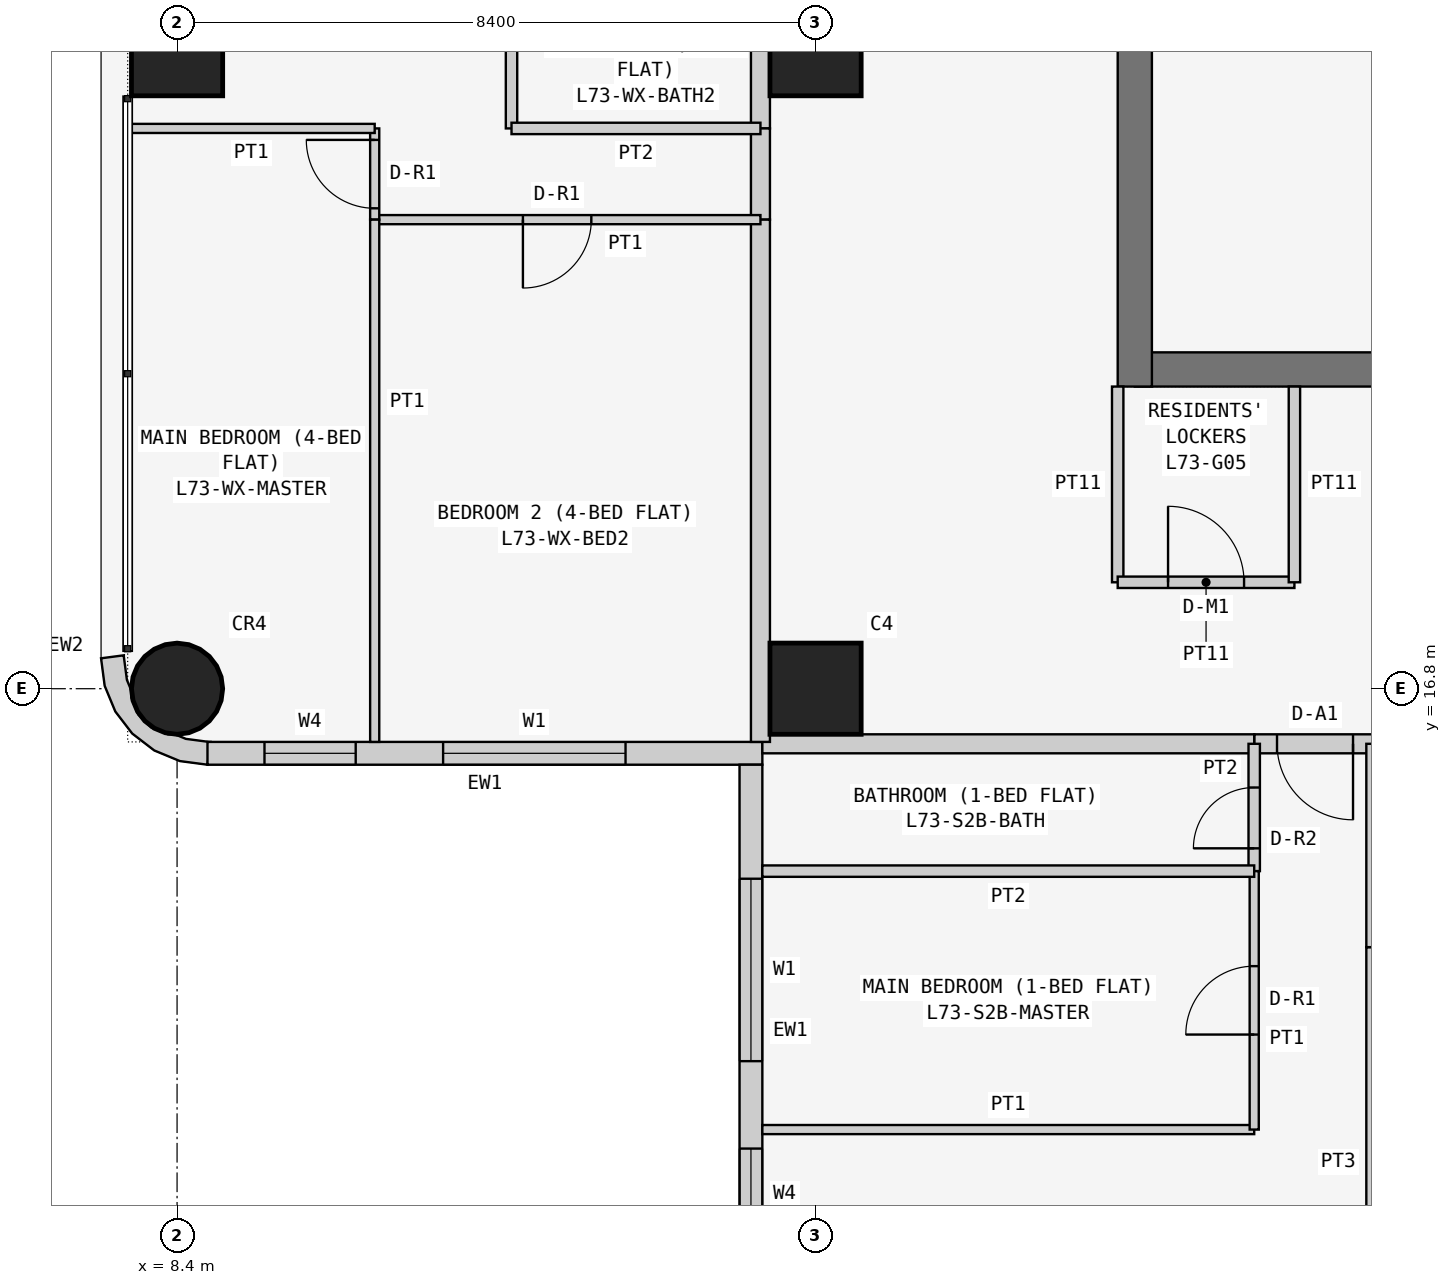
"""IFC4 building model, lengths in metres.
Left out: names, types, materials, properties, quantities, classifications, styles, units other than length and angle.
Written with IfcOpenShell. Run it as: python <this file> out.ifc"""

import sys

from ifc_helpers import new_model, si_unit, direction, frame, frame_2d, origin, origin_2d, place, context, subcontext, project, spatial, polyline, rectangle, circle, outline, extrude, element, fill, save


model = new_model("IFC4")
c1 = context("Model", 3, precision=1e-05, world=origin(), true_north=direction((0.0, 1.0)))
c2 = subcontext(c1, "Body", "Model", "MODEL_VIEW")
j1 = project(units=[si_unit("LENGTHUNIT", "METRE"), si_unit("PLANEANGLEUNIT", "RADIAN")], contexts=[c1])
p1 = place(None, origin())
s1 = spatial("IfcSite", under=j1, at=p1, CompositionType="ELEMENT")
p2 = place(p1, origin())
s2 = spatial("IfcBuilding", under=s1, at=p2, CompositionType="ELEMENT")
p3 = place(p2, frame((0.0, 0.0, 279.3)))
s3 = spatial("IfcBuildingStorey", under=s2, at=p3, CompositionType="ELEMENT", Elevation=279.3)
p4 = place(p3, frame((8.4, 16.8, 0.0), z_axis=(0.0, 0.0, 1.0), x_axis=(1.0, 0.0, 0.0)))
e1 = element("IfcColumn", 1, at=p4, inside=s3, PredefinedType="COLUMN", context=c2, shape_type="SweptSolid", body=[
    extrude(circle(Radius=0.6, at=origin_2d()), origin(), (0.0, 0.0, 1.0), 3.6),
])
for number, where, z_axis, x_axis in (
    (2, (8.4, 25.2, 0.0), (0.0, 0.0, 1.0), (1.0, 0.0, 0.0)),
    (3, (16.8, 16.8, 0.0), (0.0, 0.0, 1.0), (1.0, 0.0, 0.0)),
    (4, (16.8, 25.2, 0.0), (0.0, 0.0, 1.0), (1.0, 0.0, 0.0)),
):
    element("IfcColumn", number, at=place(p3, frame(where, z_axis=z_axis, x_axis=x_axis)), inside=s3, PredefinedType="COLUMN", context=c2, shape_type="SweptSolid", body=[
        extrude(rectangle(XDim=1.2, YDim=1.2, at=origin_2d()), origin(), (0.0, 0.0, 1.0), 3.6),
    ])
p5 = place(p3, frame((21.0, 21.0, 0.0), z_axis=(0.0, 0.0, 1.0), x_axis=(1.0, 0.0, 0.0)))
e5 = element("IfcWall", 5, at=p5, inside=s3, PredefinedType="SHEAR", context=c2, shape_type="SweptSolid", body=[
    extrude(rectangle(XDim=17.025, YDim=0.45, at=frame_2d((8.512, 0.0))), origin(), (0.0, 0.0, 1.0), 3.6),
])
p6 = place(p3, frame((21.0, 37.8, 0.0), z_axis=(0.0, 0.0, 1.0), x_axis=(0.0, -1.0, 0.0)))
e6 = element("IfcWall", 6, at=p6, inside=s3, PredefinedType="SHEAR", context=c2, shape_type="SweptSolid", body=[
    extrude(rectangle(XDim=17.025, YDim=0.45, at=frame_2d((8.513, 0.0))), origin(), (0.0, 0.0, 1.0), 3.6),
])
p7 = place(p6, frame((5.4, 0.0, 0.0)))
e7 = element("IfcOpeningElement", 7, at=p7, cuts=e6, PredefinedType="OPENING", context=c2, shape_type="SweptSolid", body=[
    extrude(rectangle(XDim=1.2, YDim=2.1, at=frame_2d((0.6, 1.05))), frame((0.0, 0.235, 0.0), z_axis=(0.0, -1.0, 0.0), x_axis=(1.0, 0.0, 0.0)), (0.0, 0.0, 1.0), 0.47),
])
p8 = place(p3, frame((8.8, 15.95, 0.0), z_axis=(0.0, 0.0, 1.0), x_axis=(1.0, 0.0, 0.0)))
e8 = element("IfcWall", 8, at=p8, inside=s3, PredefinedType="SOLIDWALL", context=c2, shape_type="SweptSolid", body=[
    extrude(rectangle(XDim=7.3, YDim=0.3, at=frame_2d((3.65, 0.0))), origin(), (0.0, 0.0, 1.0), 3.45),
])
p9 = place(p8, frame((3.1, 0.0, 0.9)))
e9 = element("IfcOpeningElement", 9, at=p9, cuts=e8, PredefinedType="OPENING", context=c2, shape_type="SweptSolid", body=[
    extrude(rectangle(XDim=2.4, YDim=1.5, at=frame_2d((1.2, 0.75))), frame((0.0, 0.16, 0.0), z_axis=(0.0, -1.0, 0.0), x_axis=(1.0, 0.0, 0.0)), (0.0, 0.0, 1.0), 0.32),
])
p10 = place(p8, frame((0.75, 0.0, 0.9)))
e10 = element("IfcOpeningElement", 10, at=p10, cuts=e8, PredefinedType="OPENING", context=c2, shape_type="SweptSolid", body=[
    extrude(rectangle(XDim=1.2, YDim=1.5, at=frame_2d((0.6, 0.75))), frame((0.0, 0.16, 0.0), z_axis=(0.0, -1.0, 0.0), x_axis=(1.0, 0.0, 0.0)), (0.0, 0.0, 1.0), 0.32),
])
p11 = place(p3, frame((15.95, 15.8, 0.0), z_axis=(0.0, 0.0, 1.0), x_axis=(0.0, -1.0, 0.0)))
e11 = element("IfcWall", 11, at=p11, inside=s3, PredefinedType="SOLIDWALL", context=c2, shape_type="SweptSolid", body=[
    extrude(rectangle(XDim=7.0, YDim=0.3, at=frame_2d((3.5, 0.0))), origin(), (0.0, 0.0, 1.0), 3.45),
])
p12 = place(p11, frame((1.5, 0.0, 0.9)))
e12 = element("IfcOpeningElement", 12, at=p12, cuts=e11, PredefinedType="OPENING", context=c2, shape_type="SweptSolid", body=[
    extrude(rectangle(XDim=2.4, YDim=1.5, at=frame_2d((1.2, 0.75))), frame((0.0, 0.16, 0.0), z_axis=(0.0, -1.0, 0.0), x_axis=(1.0, 0.0, 0.0)), (0.0, 0.0, 1.0), 0.32),
])
p13 = place(p11, frame((5.05, 0.0, 0.9)))
e13 = element("IfcOpeningElement", 13, at=p13, cuts=e11, PredefinedType="OPENING", context=c2, shape_type="SweptSolid", body=[
    extrude(rectangle(XDim=1.2, YDim=1.5, at=frame_2d((0.6, 0.75))), frame((0.0, 0.16, 0.0), z_axis=(0.0, -1.0, 0.0), x_axis=(1.0, 0.0, 0.0)), (0.0, 0.0, 1.0), 0.32),
])
p14 = place(p3, frame((7.824, 17.162, 0.0), z_axis=(0.0, 0.0, 1.0), x_axis=(-0.707106781187, -0.707106781187, 0.0)))
e14 = element("IfcWall", 14, at=p14, inside=s3, PredefinedType="SOLIDWALL", context=c2, shape_type="SweptSolid", body=[
    extrude(outline(polyline([(0.047, 1.454), (0.233, 1.212), (0.292, 1.069), (0.358, 1.003), (0.449, 0.782), (0.449, 0.543), (0.358, 0.323), (0.292, 0.257), (0.233, 0.114), (0.047, -0.129), (0.033, -0.143), (0.273, -0.327), (0.495, -0.037), (0.635, 0.301), (0.683, 0.663), (0.635, 1.025), (0.495, 1.363), (0.273, 1.653), (0.033, 1.469), (0.047, 1.454)])), origin(), (0.0, 0.0, 1.0), 3.45),
])
p15 = place(p3, frame((20.775, 20.775, 0.0), z_axis=(0.0, 0.0, 1.0), x_axis=(0.0, -1.0, 0.0)))
e15 = element("IfcWall", 15, at=p15, inside=s3, PredefinedType="PARTITIONING", context=c2, shape_type="SweptSolid", body=[
    extrude(rectangle(XDim=2.575, YDim=0.15, at=frame_2d((1.288, 0.0))), origin(), (0.0, 0.0, 1.0), 3.45),
])
p16 = place(p3, frame((20.775, 18.2, 0.0), z_axis=(0.0, 0.0, 1.0), x_axis=(1.0, 0.0, 0.0)))
e16 = element("IfcWall", 16, at=p16, inside=s3, PredefinedType="PARTITIONING", context=c2, shape_type="SweptSolid", body=[
    extrude(rectangle(XDim=2.325, YDim=0.15, at=frame_2d((1.163, 0.0))), origin(), (0.0, 0.0, 1.0), 3.45),
])
p17 = place(p16, frame((0.663, 0.0, 0.0)))
e17 = element("IfcOpeningElement", 17, at=p17, cuts=e16, PredefinedType="OPENING", context=c2, shape_type="SweptSolid", body=[
    extrude(rectangle(XDim=1.0, YDim=2.1, at=frame_2d((0.5, 1.05))), frame((0.0, 0.085, 0.0), z_axis=(0.0, -1.0, 0.0), x_axis=(1.0, 0.0, 0.0)), (0.0, 0.0, 1.0), 0.17),
])
p18 = place(p3, frame((23.1, 18.2, 0.0), z_axis=(0.0, 0.0, 1.0), x_axis=(0.0, 1.0, 0.0)))
e18 = element("IfcWall", 18, at=p18, inside=s3, PredefinedType="PARTITIONING", context=c2, shape_type="SweptSolid", body=[
    extrude(rectangle(XDim=2.575, YDim=0.15, at=frame_2d((1.288, 0.0))), origin(), (0.0, 0.0, 1.0), 3.45),
])
p19 = place(p3, frame((24.171, 16.075, 0.0), z_axis=(0.0, 0.0, 1.0), x_axis=(-1.0, 0.0, 0.0)))
e19 = element("IfcWall", 19, at=p19, inside=s3, PredefinedType="PARTITIONING", context=c2, shape_type="SweptSolid", body=[
    extrude(rectangle(XDim=1.6, YDim=0.25, at=frame_2d((0.8, 0.0))), origin(), (0.0, 0.0, 1.0), 3.45),
])
p20 = place(p19, frame((0.3, 0.0, 0.0)))
e20 = element("IfcOpeningElement", 20, at=p20, cuts=e19, PredefinedType="OPENING", context=c2, shape_type="SweptSolid", body=[
    extrude(rectangle(XDim=1.0, YDim=2.1, at=frame_2d((0.5, 1.05))), frame((0.0, 0.135, 0.0), z_axis=(0.0, -1.0, 0.0), x_axis=(1.0, 0.0, 0.0)), (0.0, 0.0, 1.0), 0.27),
])
p21 = place(p3, frame((22.571, 16.075, 0.0), z_axis=(0.0, 0.0, 1.0), x_axis=(-1.0, 0.0, 0.0)))
e21 = element("IfcWall", 21, at=p21, inside=s3, PredefinedType="PARTITIONING", context=c2, shape_type="SweptSolid", body=[
    extrude(rectangle(XDim=6.471, YDim=0.25, at=frame_2d((3.235, 0.0))), origin(), (0.0, 0.0, 1.0), 3.45),
])
p22 = place(p3, frame((16.075, 24.171, 0.0), z_axis=(0.0, 0.0, 1.0), x_axis=(0.0, 1.0, 0.0)))
e22 = element("IfcWall", 22, at=p22, inside=s3, PredefinedType="PARTITIONING", context=c2, shape_type="SweptSolid", body=[
    extrude(rectangle(XDim=2.629, YDim=0.25, at=frame_2d((1.314, 0.0))), origin(), (0.0, 0.0, 1.0), 3.45),
])
p23 = place(p3, frame((16.075, 22.971, 0.0), z_axis=(0.0, 0.0, 1.0), x_axis=(0.0, 1.0, 0.0)))
e23 = element("IfcWall", 23, at=p23, inside=s3, PredefinedType="PARTITIONING", context=c2, shape_type="SweptSolid", body=[
    extrude(rectangle(XDim=1.2, YDim=0.25, at=frame_2d((0.6, 0.0))), origin(), (0.0, 0.0, 1.0), 3.45),
])
p24 = place(p3, frame((16.075, 16.1, 0.0), z_axis=(0.0, 0.0, 1.0), x_axis=(0.0, 1.0, 0.0)))
e24 = element("IfcWall", 24, at=p24, inside=s3, PredefinedType="PARTITIONING", context=c2, shape_type="SweptSolid", body=[
    extrude(rectangle(XDim=6.871, YDim=0.25, at=frame_2d((3.436, 0.0))), origin(), (0.0, 0.0, 1.0), 3.45),
])
p25 = place(p3, frame((24.171, 7.75, 0.0), z_axis=(0.0, 0.0, 1.0), x_axis=(0.0, 1.0, 0.0)))
e25 = element("IfcWall", 25, at=p25, inside=s3, PredefinedType="PARTITIONING", context=c2, shape_type="SweptSolid", body=[
    extrude(rectangle(XDim=5.65, YDim=0.25, at=frame_2d((2.825, 0.0))), origin(), (0.0, 0.0, 1.0), 3.45),
])
p26 = place(p3, frame((24.171, 13.4, 0.0), z_axis=(0.0, 0.0, 1.0), x_axis=(0.0, 1.0, 0.0)))
e26 = element("IfcWall", 26, at=p26, inside=s3, PredefinedType="PARTITIONING", context=c2, shape_type="SweptSolid", body=[
    extrude(rectangle(XDim=2.675, YDim=0.25, at=frame_2d((1.337, 0.0))), origin(), (0.0, 0.0, 1.0), 3.45),
])
p27 = place(p3, frame((22.571, 14.4, 0.0), z_axis=(0.0, 0.0, 1.0), x_axis=(0.0, 1.0, 0.0)))
e27 = element("IfcWall", 27, at=p27, inside=s3, PredefinedType="PARTITIONING", context=c2, shape_type="SweptSolid", body=[
    extrude(rectangle(XDim=1.675, YDim=0.15, at=frame_2d((0.837, 0.0))), origin(), (0.0, 0.0, 1.0), 3.45),
])
p28 = place(p27, frame((0.3, 0.0, 0.0)))
e28 = element("IfcOpeningElement", 28, at=p28, cuts=e27, PredefinedType="OPENING", context=c2, shape_type="SweptSolid", body=[
    extrude(rectangle(XDim=0.8, YDim=2.1, at=frame_2d((0.4, 1.05))), frame((0.0, 0.085, 0.0), z_axis=(0.0, -1.0, 0.0), x_axis=(1.0, 0.0, 0.0)), (0.0, 0.0, 1.0), 0.17),
])
p29 = place(p3, frame((16.1, 11.0, 0.0), z_axis=(0.0, 0.0, 1.0), x_axis=(1.0, 0.0, 0.0)))
e29 = element("IfcWall", 29, at=p29, inside=s3, PredefinedType="PARTITIONING", context=c2, shape_type="SweptSolid", body=[
    extrude(rectangle(XDim=6.471, YDim=0.12, at=frame_2d((3.235, 0.0))), origin(), (0.0, 0.0, 1.0), 3.45),
])
p30 = place(p3, frame((22.571, 11.0, 0.0), z_axis=(0.0, 0.0, 1.0), x_axis=(0.0, 1.0, 0.0)))
e30 = element("IfcWall", 30, at=p30, inside=s3, PredefinedType="PARTITIONING", context=c2, shape_type="SweptSolid", body=[
    extrude(rectangle(XDim=3.4, YDim=0.12, at=frame_2d((1.7, 0.0))), origin(), (0.0, 0.0, 1.0), 3.45),
])
p31 = place(p30, frame((1.25, 0.0, 0.0)))
e31 = element("IfcOpeningElement", 31, at=p31, cuts=e30, PredefinedType="OPENING", context=c2, shape_type="SweptSolid", body=[
    extrude(rectangle(XDim=0.9, YDim=2.1, at=frame_2d((0.45, 1.05))), frame((0.0, 0.07, 0.0), z_axis=(0.0, -1.0, 0.0), x_axis=(1.0, 0.0, 0.0)), (0.0, 0.0, 1.0), 0.14),
])
p32 = place(p3, frame((22.571, 14.4, 0.0), z_axis=(0.0, 0.0, 1.0), x_axis=(-1.0, 0.0, 0.0)))
e32 = element("IfcWall", 32, at=p32, inside=s3, PredefinedType="PARTITIONING", context=c2, shape_type="SweptSolid", body=[
    extrude(rectangle(XDim=6.471, YDim=0.15, at=frame_2d((3.235, 0.0))), origin(), (0.0, 0.0, 1.0), 3.45),
])
p33 = place(p3, frame((12.8, 26.8, 0.0), z_axis=(0.0, 0.0, 1.0), x_axis=(0.0, -1.0, 0.0)))
e33 = element("IfcWall", 33, at=p33, inside=s3, PredefinedType="PARTITIONING", context=c2, shape_type="SweptSolid", body=[
    extrude(rectangle(XDim=2.629, YDim=0.15, at=frame_2d((1.314, 0.0))), origin(), (0.0, 0.0, 1.0), 3.45),
])
p34 = place(p3, frame((12.8, 24.171, 0.0), z_axis=(0.0, 0.0, 1.0), x_axis=(1.0, 0.0, 0.0)))
e34 = element("IfcWall", 34, at=p34, inside=s3, PredefinedType="PARTITIONING", context=c2, shape_type="SweptSolid", body=[
    extrude(rectangle(XDim=3.275, YDim=0.15, at=frame_2d((1.637, 0.0))), origin(), (0.0, 0.0, 1.0), 3.45),
])
p35 = place(p3, frame((16.075, 22.971, 0.0), z_axis=(0.0, 0.0, 1.0), x_axis=(-1.0, 0.0, 0.0)))
e35 = element("IfcWall", 35, at=p35, inside=s3, PredefinedType="PARTITIONING", context=c2, shape_type="SweptSolid", body=[
    extrude(rectangle(XDim=5.075, YDim=0.12, at=frame_2d((2.538, 0.0))), origin(), (0.0, 0.0, 1.0), 3.45),
])
p36 = place(p35, frame((2.225, 0.0, 0.0)))
e36 = element("IfcOpeningElement", 36, at=p36, cuts=e35, PredefinedType="OPENING", context=c2, shape_type="SweptSolid", body=[
    extrude(rectangle(XDim=0.9, YDim=2.1, at=frame_2d((0.45, 1.05))), frame((0.0, 0.07, 0.0), z_axis=(0.0, -1.0, 0.0), x_axis=(1.0, 0.0, 0.0)), (0.0, 0.0, 1.0), 0.14),
])
p37 = place(p3, frame((11.0, 22.971, 0.0), z_axis=(0.0, 0.0, 1.0), x_axis=(0.0, 1.0, 0.0)))
e37 = element("IfcWall", 37, at=p37, inside=s3, PredefinedType="PARTITIONING", context=c2, shape_type="SweptSolid", body=[
    extrude(rectangle(XDim=1.2, YDim=0.12, at=frame_2d((0.6, 0.0))), origin(), (0.0, 0.0, 1.0), 3.45),
])
p38 = place(p37, frame((0.149, 0.0, 0.0)))
e38 = element("IfcOpeningElement", 38, at=p38, cuts=e37, PredefinedType="OPENING", context=c2, shape_type="SweptSolid", body=[
    extrude(rectangle(XDim=0.9, YDim=2.1, at=frame_2d((0.45, 1.05))), frame((0.0, 0.07, 0.0), z_axis=(0.0, -1.0, 0.0), x_axis=(1.0, 0.0, 0.0)), (0.0, 0.0, 1.0), 0.14),
])
p39 = place(p3, frame((11.0, 24.171, 0.0), z_axis=(0.0, 0.0, 1.0), x_axis=(-1.0, 0.0, 0.0)))
e39 = element("IfcWall", 39, at=p39, inside=s3, PredefinedType="PARTITIONING", context=c2, shape_type="SweptSolid", body=[
    extrude(rectangle(XDim=3.25, YDim=0.12, at=frame_2d((1.625, 0.0))), origin(), (0.0, 0.0, 1.0), 3.45),
])
p40 = place(p3, frame((11.0, 22.971, 0.0), z_axis=(0.0, 0.0, 1.0), x_axis=(0.0, -1.0, 0.0)))
e40 = element("IfcWall", 40, at=p40, inside=s3, PredefinedType="PARTITIONING", context=c2, shape_type="SweptSolid", body=[
    extrude(rectangle(XDim=6.871, YDim=0.12, at=frame_2d((3.436, 0.0))), origin(), (0.0, 0.0, 1.0), 3.45),
])
p41 = place(p12, origin())
e41 = element("IfcWindow", 41, at=p41, inside=s3, PartitioningType="SINGLE_PANEL", PredefinedType="WINDOW", context=c2, shape_type="SweptSolid", body=[
    extrude(rectangle(XDim=2.4, YDim=1.5, at=frame_2d((1.2, 0.75))), frame((0.0, 0.03, 0.0), z_axis=(0.0, -1.0, 0.0), x_axis=(1.0, 0.0, 0.0)), (0.0, 0.0, 1.0), 0.06),
])
fill(e12, e41)
p42 = place(p13, origin())
e42 = element("IfcWindow", 42, at=p42, inside=s3, PartitioningType="SINGLE_PANEL", PredefinedType="WINDOW", context=c2, shape_type="SweptSolid", body=[
    extrude(rectangle(XDim=1.2, YDim=1.5, at=frame_2d((0.6, 0.75))), frame((0.0, 0.03, 0.0), z_axis=(0.0, -1.0, 0.0), x_axis=(1.0, 0.0, 0.0)), (0.0, 0.0, 1.0), 0.06),
])
fill(e13, e42)
p43 = place(p9, origin())
e43 = element("IfcWindow", 43, at=p43, inside=s3, PartitioningType="SINGLE_PANEL", PredefinedType="WINDOW", context=c2, shape_type="SweptSolid", body=[
    extrude(rectangle(XDim=2.4, YDim=1.5, at=frame_2d((1.2, 0.75))), frame((0.0, 0.03, 0.0), z_axis=(0.0, -1.0, 0.0), x_axis=(1.0, 0.0, 0.0)), (0.0, 0.0, 1.0), 0.06),
])
fill(e9, e43)
p44 = place(p10, origin())
e44 = element("IfcWindow", 44, at=p44, inside=s3, PartitioningType="SINGLE_PANEL", PredefinedType="WINDOW", context=c2, shape_type="SweptSolid", body=[
    extrude(rectangle(XDim=1.2, YDim=1.5, at=frame_2d((0.6, 0.75))), frame((0.0, 0.03, 0.0), z_axis=(0.0, -1.0, 0.0), x_axis=(1.0, 0.0, 0.0)), (0.0, 0.0, 1.0), 0.06),
])
fill(e10, e44)
p45 = place(p17, origin())
e45 = element("IfcDoor", 45, at=p45, inside=s3, OperationType="SINGLE_SWING_LEFT", PredefinedType="DOOR", context=c2, shape_type="SweptSolid", body=[
    extrude(rectangle(XDim=1.0, YDim=2.1, at=frame_2d((0.5, 1.05))), frame((0.0, 0.025, 0.0), z_axis=(0.0, -1.0, 0.0), x_axis=(1.0, 0.0, 0.0)), (0.0, 0.0, 1.0), 0.05),
])
fill(e17, e45)
p46 = place(p20, origin())
e46 = element("IfcDoor", 46, at=p46, inside=s3, OperationType="SINGLE_SWING_LEFT", PredefinedType="DOOR", context=c2, shape_type="SweptSolid", body=[
    extrude(rectangle(XDim=1.0, YDim=2.1, at=frame_2d((0.5, 1.05))), frame((0.0, 0.025, 0.0), z_axis=(0.0, -1.0, 0.0), x_axis=(1.0, 0.0, 0.0)), (0.0, 0.0, 1.0), 0.05),
])
fill(e20, e46)
p47 = place(p28, origin())
e47 = element("IfcDoor", 47, at=p47, inside=s3, OperationType="SINGLE_SWING_LEFT", PredefinedType="DOOR", context=c2, shape_type="SweptSolid", body=[
    extrude(rectangle(XDim=0.8, YDim=2.1, at=frame_2d((0.4, 1.05))), frame((0.0, 0.025, 0.0), z_axis=(0.0, -1.0, 0.0), x_axis=(1.0, 0.0, 0.0)), (0.0, 0.0, 1.0), 0.05),
])
fill(e28, e47)
p48 = place(p31, origin())
e48 = element("IfcDoor", 48, at=p48, inside=s3, OperationType="SINGLE_SWING_LEFT", PredefinedType="DOOR", context=c2, shape_type="SweptSolid", body=[
    extrude(rectangle(XDim=0.9, YDim=2.1, at=frame_2d((0.45, 1.05))), frame((0.0, 0.025, 0.0), z_axis=(0.0, -1.0, 0.0), x_axis=(1.0, 0.0, 0.0)), (0.0, 0.0, 1.0), 0.05),
])
fill(e31, e48)
p49 = place(p36, origin())
e49 = element("IfcDoor", 49, at=p49, inside=s3, OperationType="SINGLE_SWING_RIGHT", PredefinedType="DOOR", context=c2, shape_type="SweptSolid", body=[
    extrude(rectangle(XDim=0.9, YDim=2.1, at=frame_2d((0.45, 1.05))), frame((0.0, 0.025, 0.0), z_axis=(0.0, -1.0, 0.0), x_axis=(1.0, 0.0, 0.0)), (0.0, 0.0, 1.0), 0.05),
])
fill(e36, e49)
p50 = place(p38, origin())
e50 = element("IfcDoor", 50, at=p50, inside=s3, OperationType="SINGLE_SWING_RIGHT", PredefinedType="DOOR", context=c2, shape_type="SweptSolid", body=[
    extrude(rectangle(XDim=0.9, YDim=2.1, at=frame_2d((0.45, 1.05))), frame((0.0, 0.025, 0.0), z_axis=(0.0, -1.0, 0.0), x_axis=(1.0, 0.0, 0.0)), (0.0, 0.0, 1.0), 0.05),
])
fill(e38, e50)
save(model, sys.argv[1])
